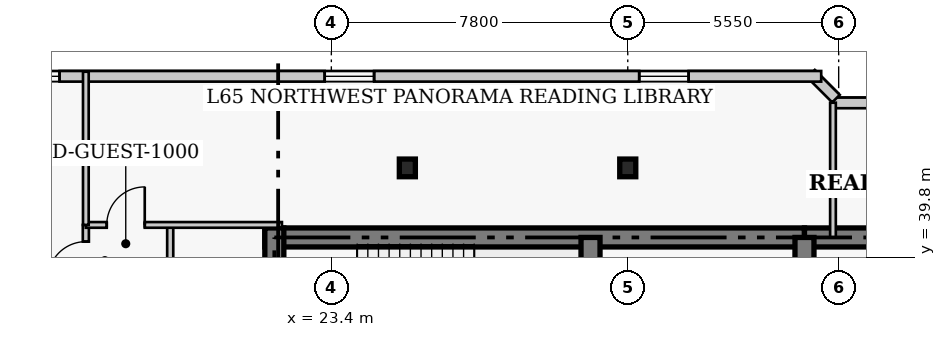
"""IFC4 building model, lengths in metres.
Left out: names, types, materials, properties, quantities, classifications, styles, units other than length and angle.
Written with IfcOpenShell. Run it as: python <this file> out.ifc"""

import sys

from ifc_helpers import new_model, si_unit, direction, frame, frame_2d, origin, origin_2d, place, context, subcontext, project, spatial, rectangle, i_section, extrude, element, fill, save


model = new_model("IFC4")
c1 = context("Model", 3, precision=1e-05, world=origin(), true_north=direction((0.0, 1.0)))
c2 = subcontext(c1, "Body", "Model", "MODEL_VIEW")
j1 = project(units=[si_unit("LENGTHUNIT", "METRE"), si_unit("PLANEANGLEUNIT", "RADIAN")], contexts=[c1])
p1 = place(None, origin())
s1 = spatial("IfcSite", under=j1, at=p1, CompositionType="ELEMENT")
p2 = place(p1, origin())
s2 = spatial("IfcBuilding", under=s1, at=p2, CompositionType="ELEMENT")
p3 = place(p2, frame((0.0, 0.0, 261.4)))
s3 = spatial("IfcBuildingStorey", under=s2, at=p3, CompositionType="ELEMENT", Elevation=261.4)
p4 = place(p3, frame((21.65, 40.32, 0.0), z_axis=(0.0, 0.0, 1.0), x_axis=(1.0, 0.0, 0.0)))
e1 = element("IfcWall", 1, at=p4, inside=s3, PredefinedType="SHEAR", context=c2, shape_type="SweptSolid", body=[
    extrude(rectangle(XDim=14.2, YDim=0.5, at=frame_2d((7.1, 0.0))), origin(), (0.0, 0.0, 1.0), 4.0),
])
p5 = place(p3, frame((35.85, 40.32, 0.0), z_axis=(0.0, 0.0, 1.0), x_axis=(1.0, 0.0, 0.0)))
e2 = element("IfcWall", 2, at=p5, inside=s3, PredefinedType="SHEAR", context=c2, shape_type="SweptSolid", body=[
    extrude(rectangle(XDim=12.6, YDim=0.5, at=frame_2d((6.3, 0.0))), origin(), (0.0, 0.0, 1.0), 4.0),
])
p6 = place(p3, frame((21.9, 27.05, 0.0), z_axis=(0.0, 0.0, 1.0), x_axis=(0.0, 1.0, 0.0)))
e3 = element("IfcWall", 3, at=p6, inside=s3, PredefinedType="SHEAR", context=c2, shape_type="SweptSolid", body=[
    extrude(rectangle(XDim=13.52, YDim=0.5, at=frame_2d((6.76, 0.0))), origin(), (0.0, 0.0, 1.0), 4.0),
])
p7 = place(p3, frame((30.22, 33.0, 0.0), z_axis=(0.0, 0.0, 1.0), x_axis=(0.0, 1.0, 0.0)))
e4 = element("IfcWall", 4, at=p7, inside=s3, PredefinedType="SHEAR", context=c2, shape_type="SweptSolid", body=[
    extrude(rectangle(XDim=7.32, YDim=0.5, at=frame_2d((3.66, 0.0))), origin(), (0.0, 0.0, 1.0), 4.0),
])
p8 = place(p3, frame((35.85, 36.37, 0.0), z_axis=(0.0, 0.0, 1.0), x_axis=(0.0, 1.0, 0.0)))
e5 = element("IfcWall", 5, at=p8, inside=s3, PredefinedType="SHEAR", context=c2, shape_type="SweptSolid", body=[
    extrude(rectangle(XDim=3.95, YDim=0.5, at=frame_2d((1.975, 0.0))), origin(), (0.0, 0.0, 1.0), 4.0),
])
p9 = place(p8, frame((0.88, 0.0, 0.0)))
e6 = element("IfcOpeningElement", 6, at=p9, cuts=e5, PredefinedType="OPENING", context=c2, shape_type="SweptSolid", body=[
    extrude(rectangle(XDim=1.1, YDim=2.15, at=frame_2d((0.55, 1.075))), frame((0.0, 0.26, 0.0), z_axis=(0.0, -1.0, 0.0), x_axis=(1.0, 0.0, 0.0)), (0.0, 0.0, 1.0), 0.52),
])
for number, where, z_axis, x_axis in (
    (7, (25.4, 42.15, 0.0), (0.0, 0.0, 1.0), (1.0, 0.0, 0.0)),
    (8, (31.2, 42.15, 0.0), (0.0, 0.0, 1.0), (1.0, 0.0, 0.0)),
):
    element("IfcColumn", number, at=place(p3, frame(where, z_axis=z_axis, x_axis=x_axis)), inside=s3, PredefinedType="COLUMN", context=c2, shape_type="SweptSolid", body=[
        extrude(i_section(OverallWidth=0.422, OverallDepth=0.465, WebThickness=0.045, FlangeThickness=0.073, FilletRadius=0.017, at=origin_2d()), origin(), (0.0, 0.0, 1.0), 4.0),
    ])
p10 = place(p3, frame((41.39, 43.86, 0.0), z_axis=(0.0, 0.0, 1.0), x_axis=(-1.0, 0.0, 0.0)))
e9 = element("IfcWall", 9, at=p10, inside=s3, PredefinedType="SOLIDWALL", context=c2, shape_type="SweptSolid", body=[
    extrude(rectangle(XDim=4.78, YDim=0.28, at=frame_2d((2.39, 0.0))), origin(), (0.0, 0.0, 1.0), 3.76),
])
p11 = place(p10, frame((1.74, 0.0, 0.85)))
e10 = element("IfcOpeningElement", 10, at=p11, cuts=e9, PredefinedType="OPENING", context=c2, shape_type="SweptSolid", body=[
    extrude(rectangle(XDim=1.3, YDim=1.7, at=frame_2d((0.65, 0.85))), frame((0.0, 0.15, 0.0), z_axis=(0.0, -1.0, 0.0), x_axis=(1.0, 0.0, 0.0)), (0.0, 0.0, 1.0), 0.3),
])
p12 = place(p3, frame((36.679, 43.973, 0.0), z_axis=(0.0, 0.0, 1.0), x_axis=(-0.706975312048, 0.707238225886, 0.0)))
e11 = element("IfcWall", 11, at=p12, inside=s3, PredefinedType="SOLIDWALL", context=c2, shape_type="SweptSolid", body=[
    extrude(rectangle(XDim=0.929, YDim=0.28, at=frame_2d((0.464, 0.0))), origin(), (0.0, 0.0, 1.0), 3.76),
])
p13 = place(p3, frame((36.29, 44.56, 0.0), z_axis=(0.0, 0.0, 1.0), x_axis=(-1.0, 0.0, 0.0)))
e12 = element("IfcWall", 12, at=p13, inside=s3, PredefinedType="SOLIDWALL", context=c2, shape_type="SweptSolid", body=[
    extrude(rectangle(XDim=24.83, YDim=0.28, at=frame_2d((12.415, 0.0))), origin(), (0.0, 0.0, 1.0), 3.76),
])
p14 = place(p13, frame((3.488, 0.0, 0.85)))
e13 = element("IfcOpeningElement", 13, at=p14, cuts=e12, PredefinedType="OPENING", context=c2, shape_type="SweptSolid", body=[
    extrude(rectangle(XDim=1.3, YDim=1.7, at=frame_2d((0.65, 0.85))), frame((0.0, 0.15, 0.0), z_axis=(0.0, -1.0, 0.0), x_axis=(1.0, 0.0, 0.0)), (0.0, 0.0, 1.0), 0.3),
])
p15 = place(p13, frame((11.765, 0.0, 0.85)))
e14 = element("IfcOpeningElement", 14, at=p15, cuts=e12, PredefinedType="OPENING", context=c2, shape_type="SweptSolid", body=[
    extrude(rectangle(XDim=1.3, YDim=1.7, at=frame_2d((0.65, 0.85))), frame((0.0, 0.15, 0.0), z_axis=(0.0, -1.0, 0.0), x_axis=(1.0, 0.0, 0.0)), (0.0, 0.0, 1.0), 0.3),
])
p16 = place(p13, frame((20.042, 0.0, 0.85)))
e15 = element("IfcOpeningElement", 15, at=p16, cuts=e12, PredefinedType="OPENING", context=c2, shape_type="SweptSolid", body=[
    extrude(rectangle(XDim=1.3, YDim=1.7, at=frame_2d((0.65, 0.85))), frame((0.0, 0.15, 0.0), z_axis=(0.0, -1.0, 0.0), x_axis=(1.0, 0.0, 0.0)), (0.0, 0.0, 1.0), 0.3),
])
p17 = place(p3, frame((16.94, 8.55, 0.0), z_axis=(0.0, 0.0, 1.0), x_axis=(0.0, 1.0, 0.0)))
e16 = element("IfcWall", 16, at=p17, inside=s3, PredefinedType="PARTITIONING", context=c2, shape_type="SweptSolid", body=[
    extrude(rectangle(XDim=32.1, YDim=0.16, at=frame_2d((16.05, 0.0))), origin(), (0.0, 0.0, 1.0), 3.76),
])
p18 = place(p17, frame((5.25, 0.0, 0.0)))
e17 = element("IfcOpeningElement", 17, at=p18, cuts=e16, PredefinedType="OPENING", context=c2, shape_type="SweptSolid", body=[
    extrude(rectangle(XDim=0.95, YDim=2.1, at=frame_2d((0.475, 1.05))), frame((0.0, 0.09, 0.0), z_axis=(0.0, -1.0, 0.0), x_axis=(1.0, 0.0, 0.0)), (0.0, 0.0, 1.0), 0.18),
])
p19 = place(p17, frame((15.375, 0.0, 0.0)))
e18 = element("IfcOpeningElement", 18, at=p19, cuts=e16, PredefinedType="OPENING", context=c2, shape_type="SweptSolid", body=[
    extrude(rectangle(XDim=0.95, YDim=2.1, at=frame_2d((0.475, 1.05))), frame((0.0, 0.09, 0.0), z_axis=(0.0, -1.0, 0.0), x_axis=(1.0, 0.0, 0.0)), (0.0, 0.0, 1.0), 0.18),
])
p20 = place(p17, frame((23.425, 0.0, 0.0)))
e19 = element("IfcOpeningElement", 19, at=p20, cuts=e16, PredefinedType="OPENING", context=c2, shape_type="SweptSolid", body=[
    extrude(rectangle(XDim=0.95, YDim=2.1, at=frame_2d((0.475, 1.05))), frame((0.0, 0.09, 0.0), z_axis=(0.0, -1.0, 0.0), x_axis=(1.0, 0.0, 0.0)), (0.0, 0.0, 1.0), 0.18),
])
p21 = place(p17, frame((30.66, 0.0, 0.0)))
e20 = element("IfcOpeningElement", 20, at=p21, cuts=e16, PredefinedType="OPENING", context=c2, shape_type="SweptSolid", body=[
    extrude(rectangle(XDim=1.0, YDim=2.15, at=frame_2d((0.5, 1.075))), frame((0.0, 0.09, 0.0), z_axis=(0.0, -1.0, 0.0), x_axis=(1.0, 0.0, 0.0)), (0.0, 0.0, 1.0), 0.18),
])
p22 = place(p3, frame((19.16, 35.02, 0.0), z_axis=(0.0, 0.0, 1.0), x_axis=(0.0, 1.0, 0.0)))
e21 = element("IfcWall", 21, at=p22, inside=s3, PredefinedType="PARTITIONING", context=c2, shape_type="SweptSolid", body=[
    extrude(rectangle(XDim=5.63, YDim=0.16, at=frame_2d((2.815, 0.0))), origin(), (0.0, 0.0, 1.0), 3.76),
])
p23 = place(p3, frame((16.94, 40.65, 0.0), z_axis=(0.0, 0.0, 1.0), x_axis=(1.0, 0.0, 0.0)))
e22 = element("IfcWall", 22, at=p23, inside=s3, PredefinedType="PARTITIONING", context=c2, shape_type="SweptSolid", body=[
    extrude(rectangle(XDim=5.16, YDim=0.15, at=frame_2d((2.58, 0.0))), origin(), (0.0, 0.0, 1.0), 3.76),
])
p24 = place(p23, frame((0.55, 0.0, 0.0)))
e23 = element("IfcOpeningElement", 23, at=p24, cuts=e22, PredefinedType="OPENING", context=c2, shape_type="SweptSolid", body=[
    extrude(rectangle(XDim=1.0, YDim=2.15, at=frame_2d((0.5, 1.075))), frame((0.0, 0.085, 0.0), z_axis=(0.0, -1.0, 0.0), x_axis=(1.0, 0.0, 0.0)), (0.0, 0.0, 1.0), 0.17),
])
p25 = place(p3, frame((16.94, 40.65, 0.0), z_axis=(0.0, 0.0, 1.0), x_axis=(0.0, 1.0, 0.0)))
e24 = element("IfcWall", 24, at=p25, inside=s3, PredefinedType="PARTITIONING", context=c2, shape_type="SweptSolid", body=[
    extrude(rectangle(XDim=4.03, YDim=0.15, at=frame_2d((2.015, 0.0))), origin(), (0.0, 0.0, 1.0), 3.76),
])
p26 = place(p3, frame((36.6, 40.32, 0.0), z_axis=(0.0, 0.0, 1.0), x_axis=(0.0, 1.0, 0.0)))
e25 = element("IfcWall", 25, at=p26, inside=s3, PredefinedType="PARTITIONING", context=c2, shape_type="SweptSolid", body=[
    extrude(rectangle(XDim=3.545, YDim=0.15, at=frame_2d((1.772, 0.0))), origin(), (0.0, 0.0, 1.0), 3.76),
])
p27 = place(p14, origin())
e26 = element("IfcWindow", 26, at=p27, inside=s3, PartitioningType="SINGLE_PANEL", PredefinedType="WINDOW", context=c2, shape_type="SweptSolid", body=[
    extrude(rectangle(XDim=1.3, YDim=1.7, at=frame_2d((0.65, 0.85))), frame((0.0, 0.03, 0.0), z_axis=(0.0, -1.0, 0.0), x_axis=(1.0, 0.0, 0.0)), (0.0, 0.0, 1.0), 0.06),
])
fill(e13, e26)
p28 = place(p15, origin())
e27 = element("IfcWindow", 27, at=p28, inside=s3, PartitioningType="SINGLE_PANEL", PredefinedType="WINDOW", context=c2, shape_type="SweptSolid", body=[
    extrude(rectangle(XDim=1.3, YDim=1.7, at=frame_2d((0.65, 0.85))), frame((0.0, 0.03, 0.0), z_axis=(0.0, -1.0, 0.0), x_axis=(1.0, 0.0, 0.0)), (0.0, 0.0, 1.0), 0.06),
])
fill(e14, e27)
p29 = place(p16, origin())
e28 = element("IfcWindow", 28, at=p29, inside=s3, PartitioningType="SINGLE_PANEL", PredefinedType="WINDOW", context=c2, shape_type="SweptSolid", body=[
    extrude(rectangle(XDim=1.3, YDim=1.7, at=frame_2d((0.65, 0.85))), frame((0.0, 0.03, 0.0), z_axis=(0.0, -1.0, 0.0), x_axis=(1.0, 0.0, 0.0)), (0.0, 0.0, 1.0), 0.06),
])
fill(e15, e28)
p30 = place(p24, origin())
e29 = element("IfcDoor", 29, at=p30, inside=s3, OperationType="SINGLE_SWING_RIGHT", PredefinedType="DOOR", context=c2, shape_type="SweptSolid", body=[
    extrude(rectangle(XDim=1.0, YDim=2.15, at=frame_2d((0.5, 1.075))), frame((0.0, 0.025, 0.0), z_axis=(0.0, -1.0, 0.0), x_axis=(1.0, 0.0, 0.0)), (0.0, 0.0, 1.0), 0.05),
])
fill(e23, e29)
p31 = place(p21, origin())
e30 = element("IfcDoor", 30, at=p31, inside=s3, OperationType="SINGLE_SWING_LEFT", PredefinedType="DOOR", context=c2, shape_type="SweptSolid", body=[
    extrude(rectangle(XDim=1.0, YDim=2.15, at=frame_2d((0.5, 1.075))), frame((0.0, 0.025, 0.0), z_axis=(0.0, -1.0, 0.0), x_axis=(1.0, 0.0, 0.0)), (0.0, 0.0, 1.0), 0.05),
])
fill(e20, e30)
save(model, sys.argv[1])
